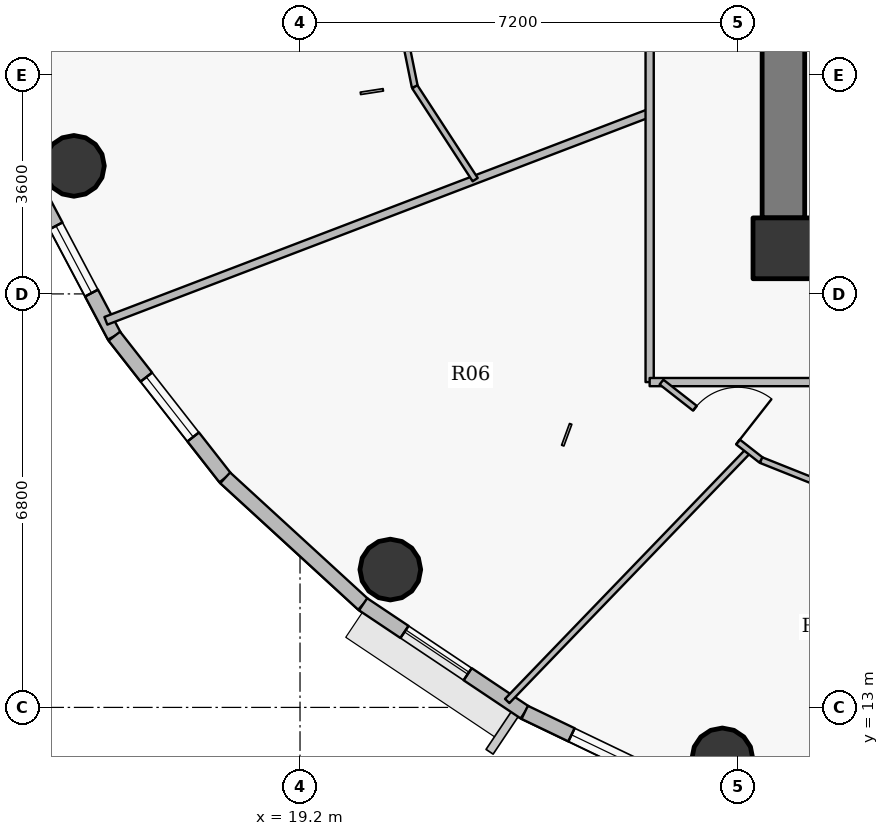
"""IFC4 building model, lengths in metres.
Left out: names, types, materials, properties, quantities, classifications, styles, units other than length and angle.
Written with IfcOpenShell. Run it as: python <this file> out.ifc"""

import sys

from ifc_helpers import new_model, si_unit, direction, frame, frame_2d, origin, origin_2d, place, context, subcontext, project, spatial, rectangle, hollow_circle, extrude, source, transform, mapped, element, fill, save


model = new_model("IFC4")
c1 = context("Model", 3, precision=1e-05, world=origin(), true_north=direction((0.0, 1.0)))
c2 = subcontext(c1, "Body", "Model", "MODEL_VIEW")
j1 = project(units=[si_unit("LENGTHUNIT", "METRE"), si_unit("PLANEANGLEUNIT", "RADIAN")], contexts=[c1])
p1 = place(None, origin())
s1 = spatial("IfcSite", under=j1, at=p1, CompositionType="ELEMENT")
p2 = place(p1, origin())
s2 = spatial("IfcBuilding", under=s1, at=p2, CompositionType="ELEMENT")
p3 = place(p2, frame((0.0, 0.0, 288.0)))
s3 = spatial("IfcBuildingStorey", under=s2, at=p3, CompositionType="ELEMENT", Elevation=288.0)
p4 = place(p3, frame((27.15, 20.55, 0.0), z_axis=(0.0, 0.0, 1.0), x_axis=(1.0, 0.0, 0.0)))
e1 = element("IfcColumn", 1, at=p4, inside=s3, PredefinedType="COLUMN", context=c2, shape_type="SweptSolid", body=[
    extrude(rectangle(XDim=1.0, YDim=1.0, at=origin_2d()), origin(), (0.0, 0.0, 1.0), 3.75),
])
p5 = place(p3, frame((27.15, 21.05, 0.0), z_axis=(0.0, 0.0, 1.0), x_axis=(0.0, 1.0, 0.0)))
e2 = element("IfcWall", 2, at=p5, inside=s3, PredefinedType="SHEAR", context=c2, shape_type="SweptSolid", body=[
    extrude(rectangle(XDim=11.9, YDim=0.7, at=frame_2d((5.95, 0.0))), origin(), (0.0, 0.0, 1.0), 3.05),
])
for number, where, z_axis, x_axis in (
    (3, (15.481, 21.906, 0.0), (0.0, 0.0, 1.0), (1.0, 0.0, 0.0)),
    (4, (20.685, 15.267, 0.0), (0.0, 0.0, 1.0), (1.0, 0.0, 0.0)),
    (5, (26.146, 12.161, 0.0), (0.0, 0.0, 1.0), (1.0, 0.0, 0.0)),
):
    element("IfcColumn", number, at=place(p3, frame(where, z_axis=z_axis, x_axis=x_axis)), inside=s3, PredefinedType="COLUMN", context=c2, shape_type="SweptSolid", body=[
        extrude(hollow_circle(Radius=0.5, WallThickness=0.032, at=origin_2d()), origin(), (0.0, 0.0, 1.0), 3.75),
    ])
p6 = place(p3, frame((16.146, 19.105, 0.0), z_axis=(0.0, 0.0, 1.0), x_axis=(-0.467628269026, 0.883925224218, 0.0)))
e6 = element("IfcWall", 6, at=p6, inside=s3, PredefinedType="SOLIDWALL", context=c2, shape_type="SweptSolid", body=[
    extrude(rectangle(XDim=2.854, YDim=0.24, at=frame_2d((1.427, 0.0))), origin(), (0.0, 0.0, 1.0), 3.5),
])
p7 = place(p6, frame((0.802, 0.0, 0.9)))
e7 = element("IfcOpeningElement", 7, at=p7, cuts=e6, PredefinedType="OPENING", context=c2, shape_type="SweptSolid", body=[
    extrude(rectangle(XDim=1.25, YDim=1.65, at=origin_2d()), frame((0.625, 0.13, 0.825), z_axis=(0.0, -1.0, 0.0), x_axis=(1.0, 0.0, 0.0)), (0.0, 0.0, 1.0), 0.26),
])
p8 = place(p3, frame((17.97, 16.775, 0.0), z_axis=(0.0, 0.0, 1.0), x_axis=(-0.616337186556, 0.787482363275, 0.0)))
e8 = element("IfcWall", 8, at=p8, inside=s3, PredefinedType="SOLIDWALL", context=c2, shape_type="SweptSolid", body=[
    extrude(rectangle(XDim=2.958, YDim=0.24, at=frame_2d((1.479, 0.0))), origin(), (0.0, 0.0, 1.0), 3.5),
])
p9 = place(p8, frame((0.854, 0.0, 0.9)))
e9 = element("IfcOpeningElement", 9, at=p9, cuts=e8, PredefinedType="OPENING", context=c2, shape_type="SweptSolid", body=[
    extrude(rectangle(XDim=1.25, YDim=1.65, at=origin_2d()), frame((0.625, 0.13, 0.825), z_axis=(0.0, -1.0, 0.0), x_axis=(1.0, 0.0, 0.0)), (0.0, 0.0, 1.0), 0.26),
])
p10 = place(p3, frame((20.238, 14.696, 0.0), z_axis=(0.0, 0.0, 1.0), x_axis=(-0.737068506972, 0.675818034703, 0.0)))
e10 = element("IfcWall", 10, at=p10, inside=s3, PredefinedType="SOLIDWALL", context=c2, shape_type="SweptSolid", body=[
    extrude(rectangle(XDim=3.077, YDim=0.24, at=frame_2d((1.539, 0.0))), origin(), (0.0, 0.0, 1.0), 3.5),
])
p11 = place(p3, frame((22.896, 12.918, 0.0), z_axis=(0.0, 0.0, 1.0), x_axis=(-0.831250592635, 0.55589787933, 0.0)))
e11 = element("IfcWall", 11, at=p11, inside=s3, PredefinedType="SOLIDWALL", context=c2, shape_type="SweptSolid", body=[
    extrude(rectangle(XDim=3.197, YDim=0.24, at=frame_2d((1.599, 0.0))), origin(), (0.0, 0.0, 1.0), 3.5),
])
p12 = place(p11, frame((1.129, 0.0, 0.9)))
e12 = element("IfcOpeningElement", 12, at=p12, cuts=e11, PredefinedType="OPENING", context=c2, shape_type="SweptSolid", body=[
    extrude(rectangle(XDim=1.25, YDim=1.65, at=origin_2d()), frame((0.625, 0.13, 0.825), z_axis=(0.0, -1.0, 0.0), x_axis=(1.0, 0.0, 0.0)), (0.0, 0.0, 1.0), 0.26),
])
p13 = place(p3, frame((25.877, 11.488, 0.0), z_axis=(0.0, 0.0, 1.0), x_axis=(-0.901573741254, 0.43262546051, 0.0)))
e13 = element("IfcWall", 13, at=p13, inside=s3, PredefinedType="SOLIDWALL", context=c2, shape_type="SweptSolid", body=[
    extrude(rectangle(XDim=3.307, YDim=0.24, at=frame_2d((1.653, 0.0))), origin(), (0.0, 0.0, 1.0), 3.5),
])
p14 = place(p13, frame((0.853, 0.0, 0.9)))
e14 = element("IfcOpeningElement", 14, at=p14, cuts=e13, PredefinedType="OPENING", context=c2, shape_type="SweptSolid", body=[
    extrude(rectangle(XDim=1.6, YDim=1.75, at=origin_2d()), frame((0.8, 0.13, 0.875), z_axis=(0.0, -1.0, 0.0), x_axis=(1.0, 0.0, 0.0)), (0.0, 0.0, 1.0), 0.26),
])
p15 = place(p3, frame((16.007, 19.358, 0.0), z_axis=(0.0, 0.0, 1.0), x_axis=(0.934094110355, 0.35702687994, 0.0)))
e15 = element("IfcWall", 15, at=p15, inside=s3, PredefinedType="PARTITIONING", context=c2, shape_type="SweptSolid", body=[
    extrude(rectangle(XDim=9.574, YDim=0.135, at=frame_2d((4.787, 0.0))), origin(), (0.0, 0.0, 1.0), 2.985),
])
p16 = place(p3, frame((20.32, 27.0, 0.0), z_axis=(0.0, 0.0, 1.0), x_axis=(0.198226068862, -0.980156327135, 0.0)))
e16 = element("IfcWall", 16, at=p16, inside=s3, PredefinedType="PARTITIONING", context=c2, shape_type="SweptSolid", body=[
    extrude(rectangle(XDim=3.871, YDim=0.1, at=frame_2d((1.936, 0.0))), origin(), (0.0, 0.0, 1.0), 3.035),
])
p17 = place(p3, frame((21.087, 23.206, 0.0), z_axis=(0.0, 0.0, 1.0), x_axis=(0.545384128846, -0.838186227519, 0.0)))
e17 = element("IfcWall", 17, at=p17, inside=s3, PredefinedType="PARTITIONING", context=c2, shape_type="SweptSolid", body=[
    extrude(rectangle(XDim=1.821, YDim=0.1, at=frame_2d((0.911, 0.0))), origin(), (0.0, 0.0, 1.0), 3.035),
])
p18 = place(p3, frame((22.607, 13.105, 0.0), z_axis=(0.0, 0.0, 1.0), x_axis=(0.693978480191, 0.71999574237, 0.0)))
e18 = element("IfcWall", 18, at=p18, inside=s3, PredefinedType="PARTITIONING", context=c2, shape_type="SweptSolid", body=[
    extrude(rectangle(XDim=5.724, YDim=0.1, at=frame_2d((2.862, 0.0))), origin(), (0.0, 0.0, 1.0), 2.985),
])
p19 = place(p3, frame((24.95, 18.35, 0.0), z_axis=(0.0, 0.0, 1.0), x_axis=(0.0, 1.0, 0.0)))
e19 = element("IfcWall", 19, at=p19, inside=s3, PredefinedType="PARTITIONING", context=c2, shape_type="SweptSolid", body=[
    extrude(rectangle(XDim=17.147, YDim=0.135, at=frame_2d((8.574, 0.0))), origin(), (0.0, 0.0, 1.0), 3.035),
])
p20 = place(p19, frame((10.267, 0.0, 0.0)))
e20 = element("IfcOpeningElement", 20, at=p20, cuts=e19, PredefinedType="OPENING", context=c2, shape_type="SweptSolid", body=[
    extrude(rectangle(XDim=1.0, YDim=2.15, at=origin_2d()), frame((0.5, 0.078, 1.075), z_axis=(0.0, -1.0, 0.0), x_axis=(1.0, 0.0, 0.0)), (0.0, 0.0, 1.0), 0.155),
])
p21 = place(p3, frame((24.95, 18.35, 0.0), z_axis=(0.0, 0.0, 1.0), x_axis=(1.0, 0.0, 0.0)))
e21 = element("IfcWall", 21, at=p21, inside=s3, PredefinedType="PARTITIONING", context=c2, shape_type="SweptSolid", body=[
    extrude(rectangle(XDim=10.1, YDim=0.135, at=frame_2d((5.05, 0.0))), origin(), (0.0, 0.0, 1.0), 3.035),
])
p22 = place(p21, frame((4.627, 0.0, 0.0)))
e22 = element("IfcOpeningElement", 22, at=p22, cuts=e21, PredefinedType="OPENING", context=c2, shape_type="SweptSolid", body=[
    extrude(rectangle(XDim=1.0, YDim=2.15, at=origin_2d()), frame((0.5, 0.078, 1.075), z_axis=(0.0, -1.0, 0.0), x_axis=(1.0, 0.0, 0.0)), (0.0, 0.0, 1.0), 0.155),
])
p23 = place(p3, frame((25.145, 18.35, 0.0), z_axis=(0.0, 0.0, 1.0), x_axis=(0.787326747019, -0.616535962803, 0.0)))
e23 = element("IfcWall", 23, at=p23, inside=s3, PredefinedType="PARTITIONING", context=c2, shape_type="SweptSolid", body=[
    extrude(rectangle(XDim=2.081, YDim=0.1, at=frame_2d((1.041, 0.0))), origin(), (0.0, 0.0, 1.0), 3.5),
])
p24 = place(p23, frame((0.698, 0.0, 0.0)))
e24 = element("IfcOpeningElement", 24, at=p24, cuts=e23, PredefinedType="OPENING", context=c2, shape_type="SweptSolid", body=[
    extrude(rectangle(XDim=0.9, YDim=2.1, at=origin_2d()), frame((0.45, 0.06, 1.05), z_axis=(0.0, -1.0, 0.0), x_axis=(1.0, 0.0, 0.0)), (0.0, 0.0, 1.0), 0.12),
])
p25 = place(p3, frame((26.783, 17.067, 0.0), z_axis=(0.0, 0.0, 1.0), x_axis=(0.928809047774, -0.370558703544, 0.0)))
e25 = element("IfcWall", 25, at=p25, inside=s3, PredefinedType="PARTITIONING", context=c2, shape_type="SweptSolid", body=[
    extrude(rectangle(XDim=4.706, YDim=0.1, at=frame_2d((2.353, 0.0))), origin(), (0.0, 0.0, 1.0), 3.035),
])
p26 = place(p3, frame((26.8, 21.04, 0.0), z_axis=(0.0, 0.0, 1.0), x_axis=(0.0, -1.0, 0.0)))
e26 = element("IfcWall", 26, at=p26, inside=s3, PredefinedType="PARTITIONING", context=c2, shape_type="SweptSolid", body=[
    extrude(rectangle(XDim=0.84, YDim=0.135, at=frame_2d((0.42, 0.0))), origin(), (0.0, 0.0, 1.0), 3.035),
])
p27 = place(p3, frame((27.107, 20.2, 0.0), z_axis=(0.0, 0.0, 1.0), x_axis=(1.0, 0.0, 0.0)))
e27 = element("IfcWall", 27, at=p27, inside=s3, PredefinedType="PARTITIONING", context=c2, shape_type="SweptSolid", body=[
    extrude(rectangle(XDim=0.532, YDim=0.135, at=frame_2d((0.266, 0.0))), origin(), (0.0, 0.0, 1.0), 3.035),
])
m1 = source(origin(), c2, "Body", "SweptSolid", [
    extrude(rectangle(XDim=1.25, YDim=1.65, at=origin_2d()), frame((0.625, 0.03, 0.825), z_axis=(0.0, -1.0, 0.0), x_axis=(1.0, 0.0, 0.0)), (0.0, 0.0, 1.0), 0.06),
])
p28 = place(p9, origin())
e28 = element("IfcWindow", 28, at=p28, inside=s3, PartitioningType="SINGLE_PANEL", PredefinedType="WINDOW", context=c2, shape_type="MappedRepresentation", body=[
    mapped(m1, transform((0.0, 0.0, 0.0), x_axis=(1.0, 0.0, 0.0), y_axis=(0.0, 1.0, 0.0), z_axis=(0.0, 0.0, 1.0), scale=1.0)),
])
fill(e9, e28)
p29 = place(p12, origin())
e29 = element("IfcWindow", 29, at=p29, inside=s3, PartitioningType="SINGLE_PANEL", PredefinedType="WINDOW", context=c2, shape_type="MappedRepresentation", body=[
    mapped(m1, transform((0.0, 0.0, 0.0), x_axis=(1.0, 0.0, 0.0), y_axis=(0.0, 1.0, 0.0), z_axis=(0.0, 0.0, 1.0), scale=1.0)),
])
fill(e12, e29)
m2 = source(origin(), c2, "Body", "SweptSolid", [
    extrude(rectangle(XDim=1.6, YDim=1.75, at=origin_2d()), frame((0.8, 0.03, 0.875), z_axis=(0.0, -1.0, 0.0), x_axis=(1.0, 0.0, 0.0)), (0.0, 0.0, 1.0), 0.06),
])
p30 = place(p14, origin())
e30 = element("IfcWindow", 30, at=p30, inside=s3, PartitioningType="DOUBLE_PANEL_VERTICAL", PredefinedType="WINDOW", context=c2, shape_type="MappedRepresentation", body=[
    mapped(m2, transform((0.0, 0.0, 0.0), x_axis=(1.0, 0.0, 0.0), y_axis=(0.0, 1.0, 0.0), z_axis=(0.0, 0.0, 1.0), scale=1.0)),
])
fill(e14, e30)
p31 = place(p7, origin())
e31 = element("IfcWindow", 31, at=p31, inside=s3, PartitioningType="SINGLE_PANEL", PredefinedType="WINDOW", context=c2, shape_type="MappedRepresentation", body=[
    mapped(m1, transform((0.0, 0.0, 0.0), x_axis=(1.0, 0.0, 0.0), y_axis=(0.0, 1.0, 0.0), z_axis=(0.0, 0.0, 1.0), scale=1.0)),
])
fill(e7, e31)
m3 = source(origin(), c2, "Body", "SweptSolid", [
    extrude(rectangle(XDim=0.9, YDim=2.1, at=origin_2d()), frame((0.45, 0.025, 1.05), z_axis=(0.0, -1.0, 0.0), x_axis=(1.0, 0.0, 0.0)), (0.0, 0.0, 1.0), 0.05),
])
p32 = place(p24, origin())
e32 = element("IfcDoor", 32, at=p32, inside=s3, OperationType="SINGLE_SWING_RIGHT", PredefinedType="DOOR", context=c2, shape_type="MappedRepresentation", body=[
    mapped(m3, transform((0.0, 0.0, 0.0), x_axis=(1.0, 0.0, 0.0), y_axis=(0.0, 1.0, 0.0), z_axis=(0.0, 0.0, 1.0), scale=1.0)),
])
fill(e24, e32)
save(model, sys.argv[1])
